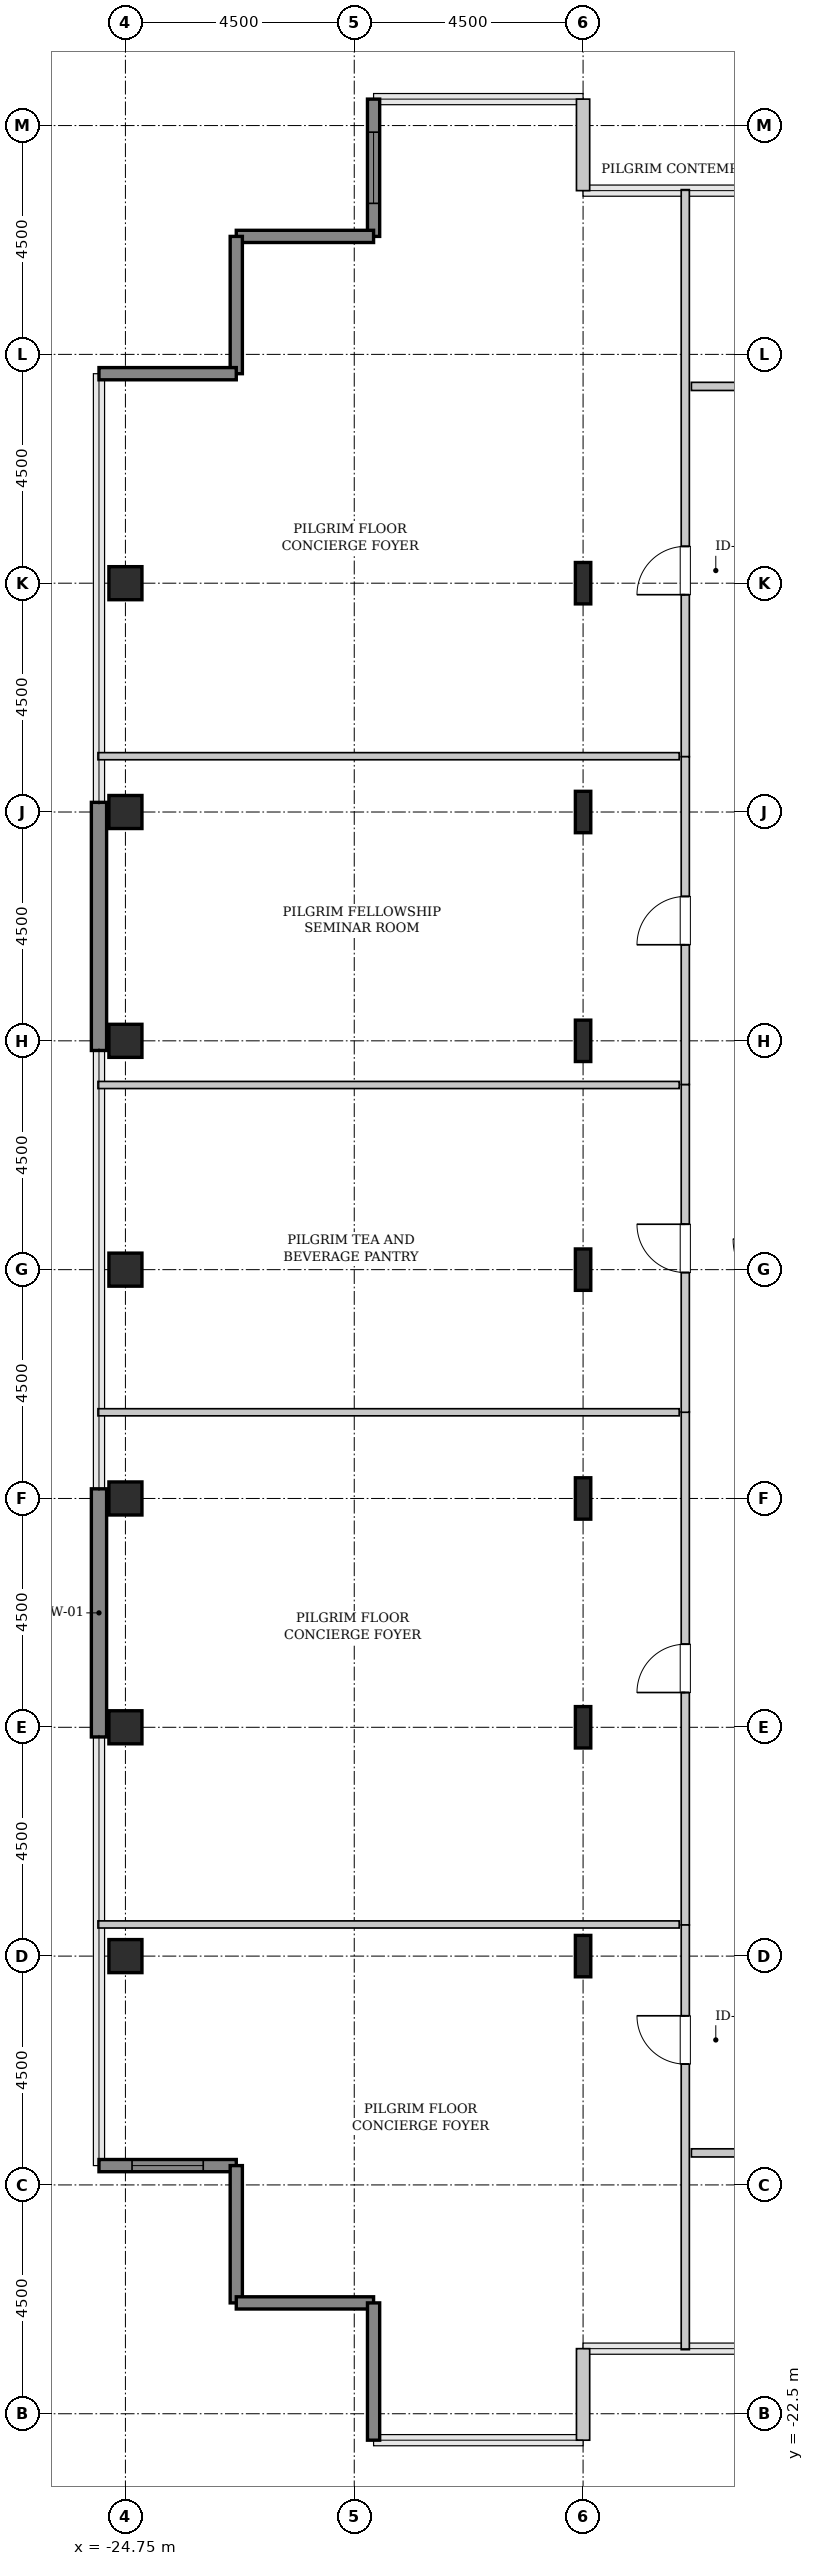
"""IFC4 building model, lengths in metres.
Left out: names, types, materials, properties, quantities, classifications, styles, units other than length and angle.
Written with IfcOpenShell. Run it as: python <this file> out.ifc"""

import sys

from ifc_helpers import new_model, si_unit, direction, frame, frame_2d, origin, origin_2d, place, context, subcontext, project, spatial, rectangle, hollow_rectangle, i_section, extrude, source, transform, mapped, element, fill, save


model = new_model("IFC4")
c1 = context("Model", 3, precision=1e-05, world=origin(), true_north=direction((0.0, 1.0)))
c2 = subcontext(c1, "Body", "Model", "MODEL_VIEW")
j1 = project(units=[si_unit("LENGTHUNIT", "METRE"), si_unit("PLANEANGLEUNIT", "RADIAN")], contexts=[c1])
p1 = place(None, origin())
s1 = spatial("IfcSite", under=j1, at=p1, CompositionType="ELEMENT")
p2 = place(p1, origin())
s2 = spatial("IfcBuilding", under=s1, at=p2, CompositionType="ELEMENT")
p3 = place(p2, frame((0.0, 0.0, 218.0)))
s3 = spatial("IfcBuildingStorey", under=s2, at=p3, CompositionType="ELEMENT", Elevation=218.0)
m1 = source(origin(), c2, "Body", "SweptSolid", [
    extrude(hollow_rectangle(XDim=0.65, YDim=0.65, WallThickness=0.032, InnerFilletRadius=0.032, OuterFilletRadius=0.064, at=origin_2d()), origin(), (0.0, 0.0, 1.0), 3.8),
])
for number, where, z_axis, x_axis in (
    (1, (-24.75, -13.5, 0.0), (0.0, 0.0, 1.0), (1.0, 0.0, 0.0)),
    (2, (-24.75, -9.0, 0.0), (0.0, 0.0, 1.0), (1.0, 0.0, 0.0)),
    (3, (-24.75, -4.5, 0.0), (0.0, 0.0, 1.0), (1.0, 0.0, 0.0)),
    (4, (-24.75, 0.0, 0.0), (0.0, 0.0, 1.0), (1.0, 0.0, 0.0)),
    (5, (-24.75, 4.5, 0.0), (0.0, 0.0, 1.0), (1.0, 0.0, 0.0)),
    (6, (-24.75, 9.0, 0.0), (0.0, 0.0, 1.0), (1.0, 0.0, 0.0)),
    (7, (-24.75, 13.5, 0.0), (0.0, 0.0, 1.0), (1.0, 0.0, 0.0)),
):
    element("IfcColumn", number, at=place(p3, frame(where, z_axis=z_axis, x_axis=x_axis)), inside=s3, PredefinedType="COLUMN", context=c2, shape_type="MappedRepresentation", body=[
        mapped(m1, transform((0.0, 0.0, 0.0), x_axis=(1.0, 0.0, 0.0), y_axis=(0.0, 1.0, 0.0), z_axis=(0.0, 0.0, 1.0), scale=1.0)),
    ])
m2 = source(origin(), c2, "Body", "SweptSolid", [
    extrude(i_section(OverallWidth=0.303, OverallDepth=0.814, WebThickness=0.021, FlangeThickness=0.04, FilletRadius=0.03, at=origin_2d()), origin(), (0.0, 0.0, 1.0), 3.8),
])
for number, where, z_axis, x_axis in (
    (8, (-15.75, -13.5, 0.0), (0.0, 0.0, 1.0), (1.0, 0.0, 0.0)),
    (9, (-15.75, -9.0, 0.0), (0.0, 0.0, 1.0), (1.0, 0.0, 0.0)),
    (10, (-15.75, -4.5, 0.0), (0.0, 0.0, 1.0), (1.0, 0.0, 0.0)),
    (11, (-15.75, 0.0, 0.0), (0.0, 0.0, 1.0), (1.0, 0.0, 0.0)),
    (12, (-15.75, 4.5, 0.0), (0.0, 0.0, 1.0), (1.0, 0.0, 0.0)),
    (13, (-15.75, 9.0, 0.0), (0.0, 0.0, 1.0), (1.0, 0.0, 0.0)),
    (14, (-15.75, 13.5, 0.0), (0.0, 0.0, 1.0), (1.0, 0.0, 0.0)),
):
    element("IfcColumn", number, at=place(p3, frame(where, z_axis=z_axis, x_axis=x_axis)), inside=s3, PredefinedType="COLUMN", context=c2, shape_type="MappedRepresentation", body=[
        mapped(m2, transform((0.0, 0.0, 0.0), x_axis=(1.0, 0.0, 0.0), y_axis=(0.0, 1.0, 0.0), z_axis=(0.0, 0.0, 1.0), scale=1.0)),
    ])
m3 = source(origin(), c2, "Body", "SweptSolid", [
    extrude(rectangle(XDim=4.88, YDim=0.3, at=frame_2d((2.44, 0.0))), origin(), (0.0, 0.0, 1.0), 3.55),
])
for number, where, z_axis, x_axis in (
    (15, (-25.27, -9.19, 0.0), (0.0, 0.0, 1.0), (0.0, 1.0, 0.0)),
    (16, (-25.27, 4.31, 0.0), (0.0, 0.0, 1.0), (0.0, 1.0, 0.0)),
):
    element("IfcWall", number, at=place(p3, frame(where, z_axis=z_axis, x_axis=x_axis)), inside=s3, PredefinedType="SHEAR", context=c2, shape_type="MappedRepresentation", body=[
        mapped(m3, transform((0.0, 0.0, 0.0), x_axis=(1.0, 0.0, 0.0), y_axis=(0.0, 1.0, 0.0), z_axis=(0.0, 0.0, 1.0), scale=1.0)),
    ])
m4 = source(origin(), c2, "Body", "SweptSolid", [
    extrude(rectangle(XDim=1.8, YDim=0.26, at=frame_2d((0.9, 0.0))), origin(), (0.0, 0.0, 1.0), 3.55),
])
p4 = place(p3, frame((-15.75, 21.22, 0.0), z_axis=(0.0, 0.0, 1.0), x_axis=(0.0, 1.0, 0.0)))
e17 = element("IfcWall", 17, at=p4, inside=s3, PredefinedType="SOLIDWALL", context=c2, shape_type="MappedRepresentation", body=[
    mapped(m4, transform((0.0, 0.0, 0.0), x_axis=(1.0, 0.0, 0.0), y_axis=(0.0, 1.0, 0.0), z_axis=(0.0, 0.0, 1.0), scale=1.0)),
])
m5 = source(origin(), c2, "Body", "SweptSolid", [
    extrude(rectangle(XDim=2.7, YDim=0.24, at=frame_2d((1.35, 0.0))), origin(), (0.0, 0.0, 1.0), 3.55),
])
p5 = place(p3, frame((-19.87, 23.02, 0.0), z_axis=(0.0, 0.0, 1.0), x_axis=(0.0, -1.0, 0.0)))
e18 = element("IfcWall", 18, at=p5, inside=s3, PredefinedType="SHEAR", context=c2, shape_type="MappedRepresentation", body=[
    mapped(m5, transform((0.0, 0.0, 0.0), x_axis=(1.0, 0.0, 0.0), y_axis=(0.0, 1.0, 0.0), z_axis=(0.0, 0.0, 1.0), scale=1.0)),
])
p6 = place(p5, frame((0.65, 0.0, 0.85)))
e19 = element("IfcOpeningElement", 19, at=p6, cuts=e18, PredefinedType="OPENING", context=c2, shape_type="SweptSolid", body=[
    extrude(rectangle(XDim=1.4, YDim=1.8, at=frame_2d((0.7, 0.9))), frame((0.0, 0.13, 0.0), z_axis=(0.0, -1.0, 0.0), x_axis=(1.0, 0.0, 0.0)), (0.0, 0.0, 1.0), 0.26),
])
for number, where, z_axis, x_axis in (
    (20, (-19.87, 20.32, 0.0), (0.0, 0.0, 1.0), (-1.0, 0.0, 0.0)),
    (21, (-22.57, 20.32, 0.0), (0.0, 0.0, 1.0), (0.0, -1.0, 0.0)),
    (22, (-22.57, 17.62, 0.0), (0.0, 0.0, 1.0), (-1.0, 0.0, 0.0)),
):
    element("IfcWall", number, at=place(p3, frame(where, z_axis=z_axis, x_axis=x_axis)), inside=s3, PredefinedType="SHEAR", context=c2, shape_type="MappedRepresentation", body=[
        mapped(m5, transform((0.0, 0.0, 0.0), x_axis=(1.0, 0.0, 0.0), y_axis=(0.0, 1.0, 0.0), z_axis=(0.0, 0.0, 1.0), scale=1.0)),
    ])
p7 = place(p3, frame((-25.27, -17.62, 0.0), z_axis=(0.0, 0.0, 1.0), x_axis=(1.0, 0.0, 0.0)))
e23 = element("IfcWall", 23, at=p7, inside=s3, PredefinedType="SHEAR", context=c2, shape_type="MappedRepresentation", body=[
    mapped(m5, transform((0.0, 0.0, 0.0), x_axis=(1.0, 0.0, 0.0), y_axis=(0.0, 1.0, 0.0), z_axis=(0.0, 0.0, 1.0), scale=1.0)),
])
p8 = place(p7, frame((0.65, 0.0, 0.85)))
e24 = element("IfcOpeningElement", 24, at=p8, cuts=e23, PredefinedType="OPENING", context=c2, shape_type="SweptSolid", body=[
    extrude(rectangle(XDim=1.4, YDim=1.8, at=frame_2d((0.7, 0.9))), frame((0.0, 0.13, 0.0), z_axis=(0.0, -1.0, 0.0), x_axis=(1.0, 0.0, 0.0)), (0.0, 0.0, 1.0), 0.26),
])
for number, where, z_axis, x_axis in (
    (25, (-22.57, -17.62, 0.0), (0.0, 0.0, 1.0), (0.0, -1.0, 0.0)),
    (26, (-22.57, -20.32, 0.0), (0.0, 0.0, 1.0), (1.0, 0.0, 0.0)),
    (27, (-19.87, -20.32, 0.0), (0.0, 0.0, 1.0), (0.0, -1.0, 0.0)),
):
    element("IfcWall", number, at=place(p3, frame(where, z_axis=z_axis, x_axis=x_axis)), inside=s3, PredefinedType="SHEAR", context=c2, shape_type="MappedRepresentation", body=[
        mapped(m5, transform((0.0, 0.0, 0.0), x_axis=(1.0, 0.0, 0.0), y_axis=(0.0, 1.0, 0.0), z_axis=(0.0, 0.0, 1.0), scale=1.0)),
    ])
p9 = place(p3, frame((-15.75, -23.02, 0.0), z_axis=(0.0, 0.0, 1.0), x_axis=(0.0, 1.0, 0.0)))
e28 = element("IfcWall", 28, at=p9, inside=s3, PredefinedType="SOLIDWALL", context=c2, shape_type="MappedRepresentation", body=[
    mapped(m4, transform((0.0, 0.0, 0.0), x_axis=(1.0, 0.0, 0.0), y_axis=(0.0, 1.0, 0.0), z_axis=(0.0, 0.0, 1.0), scale=1.0)),
])
m6 = source(origin(), c2, "Body", "SweptSolid", [
    extrude(rectangle(XDim=10.093, YDim=0.16, at=frame_2d((5.046, 0.0))), origin(), (0.0, 0.0, 1.0), 3.535),
])
p10 = place(p3, frame((-13.74, -12.887, 0.0), z_axis=(0.0, 0.0, 1.0), x_axis=(0.0, 1.0, 0.0)))
e29 = element("IfcWall", 29, at=p10, inside=s3, PredefinedType="PARTITIONING", context=c2, shape_type="MappedRepresentation", body=[
    mapped(m6, transform((0.0, 0.0, 0.0), x_axis=(1.0, 0.0, 0.0), y_axis=(0.0, 1.0, 0.0), z_axis=(0.0, 0.0, 1.0), scale=1.0)),
])
p11 = place(p10, frame((4.571, 0.0, 0.0)))
e30 = element("IfcOpeningElement", 30, at=p11, cuts=e29, PredefinedType="OPENING", context=c2, shape_type="SweptSolid", body=[
    extrude(rectangle(XDim=0.95, YDim=2.1, at=frame_2d((0.475, 1.05))), frame((0.0, 0.09, 0.0), z_axis=(0.0, -1.0, 0.0), x_axis=(1.0, 0.0, 0.0)), (0.0, 0.0, 1.0), 0.18),
])
m7 = source(origin(), c2, "Body", "SweptSolid", [
    extrude(rectangle(XDim=11.43, YDim=0.14, at=frame_2d((5.715, 0.0))), origin(), (0.0, 0.0, 1.0), 3.535),
])
for number, where, z_axis, x_axis in (
    (31, (-25.29, -12.877, 0.0), (0.0, 0.0, 1.0), (1.0, 0.0, 0.0)),
    (32, (-25.29, -2.805, 0.0), (0.0, 0.0, 1.0), (1.0, 0.0, 0.0)),
):
    element("IfcWall", number, at=place(p3, frame(where, z_axis=z_axis, x_axis=x_axis)), inside=s3, PredefinedType="PARTITIONING", context=c2, shape_type="MappedRepresentation", body=[
        mapped(m7, transform((0.0, 0.0, 0.0), x_axis=(1.0, 0.0, 0.0), y_axis=(0.0, 1.0, 0.0), z_axis=(0.0, 0.0, 1.0), scale=1.0)),
    ])
m8 = source(origin(), c2, "Body", "SweptSolid", [
    extrude(rectangle(XDim=8.353, YDim=0.16, at=frame_2d((4.176, 0.0))), origin(), (0.0, 0.0, 1.0), 3.535),
])
p12 = place(p3, frame((-13.74, -21.24, 0.0), z_axis=(0.0, 0.0, 1.0), x_axis=(0.0, 1.0, 0.0)))
e33 = element("IfcWall", 33, at=p12, inside=s3, PredefinedType="PARTITIONING", context=c2, shape_type="MappedRepresentation", body=[
    mapped(m8, transform((0.0, 0.0, 0.0), x_axis=(1.0, 0.0, 0.0), y_axis=(0.0, 1.0, 0.0), z_axis=(0.0, 0.0, 1.0), scale=1.0)),
])
p13 = place(p12, frame((5.616, 0.0, 0.0)))
e34 = element("IfcOpeningElement", 34, at=p13, cuts=e33, PredefinedType="OPENING", context=c2, shape_type="SweptSolid", body=[
    extrude(rectangle(XDim=0.95, YDim=2.1, at=frame_2d((0.475, 1.05))), frame((0.0, 0.09, 0.0), z_axis=(0.0, -1.0, 0.0), x_axis=(1.0, 0.0, 0.0)), (0.0, 0.0, 1.0), 0.18),
])
m9 = source(origin(), c2, "Body", "SweptSolid", [
    extrude(rectangle(XDim=11.153, YDim=0.16, at=frame_2d((5.576, 0.0))), origin(), (0.0, 0.0, 1.0), 3.535),
])
p14 = place(p3, frame((-13.74, 10.087, 0.0), z_axis=(0.0, 0.0, 1.0), x_axis=(0.0, 1.0, 0.0)))
e35 = element("IfcWall", 35, at=p14, inside=s3, PredefinedType="PARTITIONING", context=c2, shape_type="MappedRepresentation", body=[
    mapped(m9, transform((0.0, 0.0, 0.0), x_axis=(1.0, 0.0, 0.0), y_axis=(0.0, 1.0, 0.0), z_axis=(0.0, 0.0, 1.0), scale=1.0)),
])
p15 = place(p14, frame((3.186, 0.0, 0.0)))
e36 = element("IfcOpeningElement", 36, at=p15, cuts=e35, PredefinedType="OPENING", context=c2, shape_type="SweptSolid", body=[
    extrude(rectangle(XDim=0.95, YDim=2.1, at=frame_2d((0.475, 1.05))), frame((0.0, 0.09, 0.0), z_axis=(0.0, -1.0, 0.0), x_axis=(1.0, 0.0, 0.0)), (0.0, 0.0, 1.0), 0.18),
])
p16 = place(p3, frame((-25.29, 10.097, 0.0), z_axis=(0.0, 0.0, 1.0), x_axis=(1.0, 0.0, 0.0)))
e37 = element("IfcWall", 37, at=p16, inside=s3, PredefinedType="PARTITIONING", context=c2, shape_type="MappedRepresentation", body=[
    mapped(m7, transform((0.0, 0.0, 0.0), x_axis=(1.0, 0.0, 0.0), y_axis=(0.0, 1.0, 0.0), z_axis=(0.0, 0.0, 1.0), scale=1.0)),
])
m10 = source(origin(), c2, "Body", "SweptSolid", [
    extrude(rectangle(XDim=6.446, YDim=0.16, at=frame_2d((3.223, 0.0))), origin(), (0.0, 0.0, 1.0), 3.535),
])
p17 = place(p3, frame((-13.74, -2.805, 0.0), z_axis=(0.0, 0.0, 1.0), x_axis=(0.0, 1.0, 0.0)))
e38 = element("IfcWall", 38, at=p17, inside=s3, PredefinedType="PARTITIONING", context=c2, shape_type="MappedRepresentation", body=[
    mapped(m10, transform((0.0, 0.0, 0.0), x_axis=(1.0, 0.0, 0.0), y_axis=(0.0, 1.0, 0.0), z_axis=(0.0, 0.0, 1.0), scale=1.0)),
])
p18 = place(p17, frame((2.748, 0.0, 0.0)))
e39 = element("IfcOpeningElement", 39, at=p18, cuts=e38, PredefinedType="OPENING", context=c2, shape_type="SweptSolid", body=[
    extrude(rectangle(XDim=0.95, YDim=2.1, at=frame_2d((0.475, 1.05))), frame((0.0, 0.09, 0.0), z_axis=(0.0, -1.0, 0.0), x_axis=(1.0, 0.0, 0.0)), (0.0, 0.0, 1.0), 0.18),
])
p19 = place(p3, frame((-25.29, 3.631, 0.0), z_axis=(0.0, 0.0, 1.0), x_axis=(1.0, 0.0, 0.0)))
e40 = element("IfcWall", 40, at=p19, inside=s3, PredefinedType="PARTITIONING", context=c2, shape_type="MappedRepresentation", body=[
    mapped(m7, transform((0.0, 0.0, 0.0), x_axis=(1.0, 0.0, 0.0), y_axis=(0.0, 1.0, 0.0), z_axis=(0.0, 0.0, 1.0), scale=1.0)),
])
m11 = source(origin(), c2, "Body", "SweptSolid", [
    extrude(rectangle(XDim=6.446, YDim=0.16, at=frame_2d((3.223, 0.0))), origin(), (0.0, 0.0, 1.0), 3.535),
])
p20 = place(p3, frame((-13.74, 3.641, 0.0), z_axis=(0.0, 0.0, 1.0), x_axis=(0.0, 1.0, 0.0)))
e41 = element("IfcWall", 41, at=p20, inside=s3, PredefinedType="PARTITIONING", context=c2, shape_type="MappedRepresentation", body=[
    mapped(m11, transform((0.0, 0.0, 0.0), x_axis=(1.0, 0.0, 0.0), y_axis=(0.0, 1.0, 0.0), z_axis=(0.0, 0.0, 1.0), scale=1.0)),
])
p21 = place(p20, frame((2.748, 0.0, 0.0)))
e42 = element("IfcOpeningElement", 42, at=p21, cuts=e41, PredefinedType="OPENING", context=c2, shape_type="SweptSolid", body=[
    extrude(rectangle(XDim=0.95, YDim=2.1, at=frame_2d((0.475, 1.05))), frame((0.0, 0.09, 0.0), z_axis=(0.0, -1.0, 0.0), x_axis=(1.0, 0.0, 0.0)), (0.0, 0.0, 1.0), 0.18),
])
m12 = source(origin(), c2, "Body", "SweptSolid", [
    extrude(rectangle(XDim=4.16, YDim=0.16, at=frame_2d((2.08, 0.0))), origin(), (0.0, 0.0, 1.0), 3.535),
])
p22 = place(p3, frame((-13.62, 17.37, 0.0), z_axis=(0.0, 0.0, 1.0), x_axis=(1.0, 0.0, 0.0)))
e43 = element("IfcWall", 43, at=p22, inside=s3, PredefinedType="PARTITIONING", context=c2, shape_type="MappedRepresentation", body=[
    mapped(m12, transform((0.0, 0.0, 0.0), x_axis=(1.0, 0.0, 0.0), y_axis=(0.0, 1.0, 0.0), z_axis=(0.0, 0.0, 1.0), scale=1.0)),
])
p23 = place(p22, frame((0.969, 0.0, 0.0)))
e44 = element("IfcOpeningElement", 44, at=p23, cuts=e43, PredefinedType="OPENING", context=c2, shape_type="SweptSolid", body=[
    extrude(rectangle(XDim=0.95, YDim=2.1, at=frame_2d((0.475, 1.05))), frame((0.0, 0.09, 0.0), z_axis=(0.0, -1.0, 0.0), x_axis=(1.0, 0.0, 0.0)), (0.0, 0.0, 1.0), 0.18),
])
m13 = source(origin(), c2, "Body", "SweptSolid", [
    extrude(rectangle(XDim=8.86, YDim=0.16, at=frame_2d((4.43, 0.0))), origin(), (0.0, 0.0, 1.0), 3.535),
])
p24 = place(p3, frame((-13.62, -17.37, 0.0), z_axis=(0.0, 0.0, 1.0), x_axis=(1.0, 0.0, 0.0)))
e45 = element("IfcWall", 45, at=p24, inside=s3, PredefinedType="PARTITIONING", context=c2, shape_type="MappedRepresentation", body=[
    mapped(m13, transform((0.0, 0.0, 0.0), x_axis=(1.0, 0.0, 0.0), y_axis=(0.0, 1.0, 0.0), z_axis=(0.0, 0.0, 1.0), scale=1.0)),
])
p25 = place(p24, frame((3.955, 0.0, 0.0)))
e46 = element("IfcOpeningElement", 46, at=p25, cuts=e45, PredefinedType="OPENING", context=c2, shape_type="SweptSolid", body=[
    extrude(rectangle(XDim=0.95, YDim=2.1, at=frame_2d((0.475, 1.05))), frame((0.0, 0.09, 0.0), z_axis=(0.0, -1.0, 0.0), x_axis=(1.0, 0.0, 0.0)), (0.0, 0.0, 1.0), 0.18),
])
m14 = source(origin(), c2, "Body", "SweptSolid", [
    extrude(rectangle(XDim=1.4, YDim=1.8, at=frame_2d((0.7, 0.9))), frame((0.0, 0.03, 0.0), z_axis=(0.0, -1.0, 0.0), x_axis=(1.0, 0.0, 0.0)), (0.0, 0.0, 1.0), 0.06),
])
p26 = place(p6, origin())
e47 = element("IfcWindow", 47, at=p26, inside=s3, PartitioningType="SINGLE_PANEL", PredefinedType="WINDOW", context=c2, shape_type="MappedRepresentation", body=[
    mapped(m14, transform((0.0, 0.0, 0.0), x_axis=(1.0, 0.0, 0.0), y_axis=(0.0, 1.0, 0.0), z_axis=(0.0, 0.0, 1.0), scale=1.0)),
])
fill(e19, e47)
p27 = place(p8, origin())
e48 = element("IfcWindow", 48, at=p27, inside=s3, PartitioningType="SINGLE_PANEL", PredefinedType="WINDOW", context=c2, shape_type="MappedRepresentation", body=[
    mapped(m14, transform((0.0, 0.0, 0.0), x_axis=(1.0, 0.0, 0.0), y_axis=(0.0, 1.0, 0.0), z_axis=(0.0, 0.0, 1.0), scale=1.0)),
])
fill(e24, e48)
m15 = source(origin(), c2, "Body", "SweptSolid", [
    extrude(rectangle(XDim=0.95, YDim=2.1, at=frame_2d((0.475, 1.05))), frame((0.0, 0.025, 0.0), z_axis=(0.0, -1.0, 0.0), x_axis=(1.0, 0.0, 0.0)), (0.0, 0.0, 1.0), 0.05),
])
p28 = place(p11, origin())
e49 = element("IfcDoor", 49, at=p28, inside=s3, OperationType="SINGLE_SWING_LEFT", PredefinedType="DOOR", context=c2, shape_type="MappedRepresentation", body=[
    mapped(m15, transform((0.0, 0.0, 0.0), x_axis=(1.0, 0.0, 0.0), y_axis=(0.0, 1.0, 0.0), z_axis=(0.0, 0.0, 1.0), scale=1.0)),
])
fill(e30, e49)
p29 = place(p13, origin())
e50 = element("IfcDoor", 50, at=p29, inside=s3, OperationType="SINGLE_SWING_RIGHT", PredefinedType="DOOR", context=c2, shape_type="MappedRepresentation", body=[
    mapped(m15, transform((0.0, 0.0, 0.0), x_axis=(1.0, 0.0, 0.0), y_axis=(0.0, 1.0, 0.0), z_axis=(0.0, 0.0, 1.0), scale=1.0)),
])
fill(e34, e50)
p30 = place(p15, origin())
e51 = element("IfcDoor", 51, at=p30, inside=s3, OperationType="SINGLE_SWING_LEFT", PredefinedType="DOOR", context=c2, shape_type="MappedRepresentation", body=[
    mapped(m15, transform((0.0, 0.0, 0.0), x_axis=(1.0, 0.0, 0.0), y_axis=(0.0, 1.0, 0.0), z_axis=(0.0, 0.0, 1.0), scale=1.0)),
])
fill(e36, e51)
p31 = place(p18, origin())
e52 = element("IfcDoor", 52, at=p31, inside=s3, OperationType="SINGLE_SWING_RIGHT", PredefinedType="DOOR", context=c2, shape_type="MappedRepresentation", body=[
    mapped(m15, transform((0.0, 0.0, 0.0), x_axis=(1.0, 0.0, 0.0), y_axis=(0.0, 1.0, 0.0), z_axis=(0.0, 0.0, 1.0), scale=1.0)),
])
fill(e39, e52)
p32 = place(p21, origin())
e53 = element("IfcDoor", 53, at=p32, inside=s3, OperationType="SINGLE_SWING_LEFT", PredefinedType="DOOR", context=c2, shape_type="MappedRepresentation", body=[
    mapped(m15, transform((0.0, 0.0, 0.0), x_axis=(1.0, 0.0, 0.0), y_axis=(0.0, 1.0, 0.0), z_axis=(0.0, 0.0, 1.0), scale=1.0)),
])
fill(e42, e53)
save(model, sys.argv[1])
